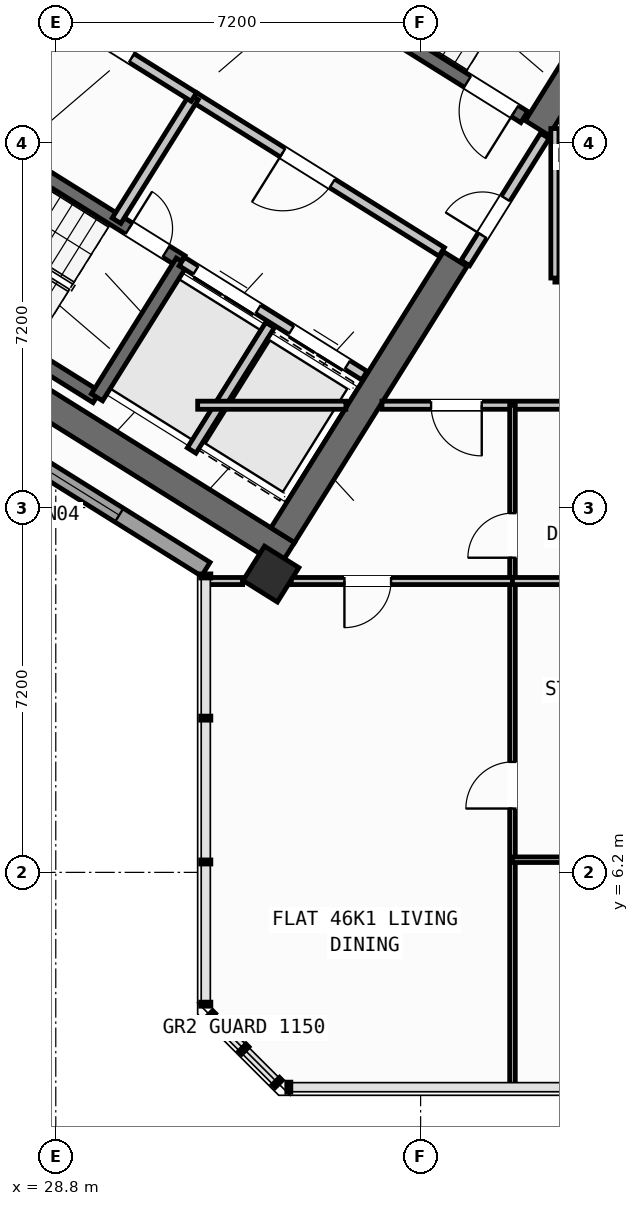
"""IFC4 building model, lengths in metres.
Left out: names, types, materials, properties, quantities, classifications, styles, units other than length and angle.
Written with IfcOpenShell. Run it as: python <this file> out.ifc"""

import sys

from ifc_helpers import new_model, si_unit, direction, frame, frame_2d, origin, origin_2d, place, context, subcontext, project, spatial, rectangle, hollow_rectangle, extrude, source, transform, mapped, element, fill, save


model = new_model("IFC4")
c1 = context("Model", 3, precision=1e-05, world=origin(), true_north=direction((0.0, 1.0)))
c2 = subcontext(c1, "Body", "Model", "MODEL_VIEW")
j1 = project(units=[si_unit("LENGTHUNIT", "METRE"), si_unit("PLANEANGLEUNIT", "RADIAN")], contexts=[c1])
p1 = place(None, origin())
s1 = spatial("IfcSite", under=j1, at=p1, CompositionType="ELEMENT")
p2 = place(p1, origin())
s2 = spatial("IfcBuilding", under=s1, at=p2, CompositionType="ELEMENT")
p3 = place(p2, frame((0.0, 0.0, 184.2)))
s3 = spatial("IfcBuildingStorey", under=s2, at=p3, CompositionType="ELEMENT", Elevation=184.2)
p4 = place(p3, frame((33.366, 12.477, 0.0), z_axis=(0.0, 0.0, 1.0), x_axis=(-0.848047359947, 0.529920442413, 0.0)))
e1 = element("IfcWall", 1, at=p4, inside=s3, PredefinedType="SHEAR", context=c2, shape_type="SweptSolid", body=[
    extrude(rectangle(XDim=13.14, YDim=0.55, at=frame_2d((6.57, 0.0))), origin(), (0.0, 0.0, 1.0), 3.35),
])
p5 = place(p3, frame((40.194, 23.922, 0.0), z_axis=(0.0, 0.0, 1.0), x_axis=(-0.529888438328, -0.848067357541, 0.0)))
e2 = element("IfcWall", 2, at=p5, inside=s3, PredefinedType="SHEAR", context=c2, shape_type="SweptSolid", body=[
    extrude(rectangle(XDim=3.575, YDim=0.55, at=frame_2d((1.788, 0.0))), origin(), (0.0, 0.0, 1.0), 3.35),
])
p6 = place(p3, frame((36.683, 18.304, 0.0), z_axis=(0.0, 0.0, 1.0), x_axis=(-0.529896466841, -0.848062341122, 0.0)))
e3 = element("IfcWall", 3, at=p6, inside=s3, PredefinedType="SHEAR", context=c2, shape_type="SweptSolid", body=[
    extrude(rectangle(XDim=6.425, YDim=0.55, at=frame_2d((3.212, 0.0))), origin(), (0.0, 0.0, 1.0), 3.35),
])
m1 = source(origin(), c2, "Body", "SweptSolid", [
    extrude(hollow_rectangle(XDim=0.8, YDim=0.8, WallThickness=0.032, at=origin_2d()), origin(), (0.0, 0.0, 1.0), 3.6),
])
p7 = place(p3, frame((33.046, 12.087, 0.0), z_axis=(0.0, 0.0, 1.0), x_axis=(-0.848048096156, 0.529919264233, 0.0)))
e4 = element("IfcColumn", 4, at=p7, inside=s3, PredefinedType="COLUMN", context=c2, shape_type="MappedRepresentation", body=[
    mapped(m1, transform((0.0, 0.0, 0.0), scale=1.0)),
])
p8 = place(p3, frame((31.76, 12.183, 0.0), z_axis=(0.0, 0.0, 1.0), x_axis=(-0.848047074256, 0.529920899612, 0.0)))
e5 = element("IfcWall", 5, at=p8, inside=s3, PredefinedType="STANDARD", context=c2, shape_type="SweptSolid", body=[
    extrude(rectangle(XDim=30.652, YDim=0.32, at=frame_2d((15.326, 0.0))), origin(), (0.0, 0.0, 1.0), 3.35),
])
p9 = place(p8, frame((15.166, 0.0, 0.0)))
e6 = element("IfcOpeningElement", 6, at=p9, cuts=e5, PredefinedType="OPENING", context=c2, shape_type="SweptSolid", body=[
    extrude(rectangle(XDim=1.2, YDim=2.15, at=frame_2d((0.6, 1.075))), frame((0.0, 0.17, 0.0), z_axis=(0.0, -1.0, 0.0), x_axis=(1.0, 0.0, 0.0)), (0.0, 0.0, 1.0), 0.34),
])
p10 = place(p8, frame((2.015, 0.0, 0.8)))
e7 = element("IfcOpeningElement", 7, at=p10, cuts=e5, PredefinedType="OPENING", context=c2, shape_type="SweptSolid", body=[
    extrude(rectangle(XDim=2.1, YDim=1.55, at=frame_2d((1.05, 0.775))), frame((0.0, 0.17, 0.0), z_axis=(0.0, -1.0, 0.0), x_axis=(1.0, 0.0, 0.0)), (0.0, 0.0, 1.0), 0.34),
])
p11 = place(p8, frame((7.244, 0.0, 0.8)))
e8 = element("IfcOpeningElement", 8, at=p11, cuts=e5, PredefinedType="OPENING", context=c2, shape_type="SweptSolid", body=[
    extrude(rectangle(XDim=2.1, YDim=1.55, at=frame_2d((1.05, 0.775))), frame((0.0, 0.17, 0.0), z_axis=(0.0, -1.0, 0.0), x_axis=(1.0, 0.0, 0.0)), (0.0, 0.0, 1.0), 0.34),
])
p12 = place(p8, frame((12.623, 0.0, 1.0)))
e9 = element("IfcOpeningElement", 9, at=p12, cuts=e5, PredefinedType="OPENING", context=c2, shape_type="SweptSolid", body=[
    extrude(rectangle(XDim=0.9, YDim=1.25, at=frame_2d((0.45, 0.625))), frame((0.0, 0.17, 0.0), z_axis=(0.0, -1.0, 0.0), x_axis=(1.0, 0.0, 0.0)), (0.0, 0.0, 1.0), 0.34),
])
p13 = place(p8, frame((19.565, 0.0, 0.95)))
e10 = element("IfcOpeningElement", 10, at=p13, cuts=e5, PredefinedType="OPENING", context=c2, shape_type="SweptSolid", body=[
    extrude(rectangle(XDim=1.2, YDim=1.4, at=frame_2d((0.6, 0.7))), frame((0.0, 0.17, 0.0), z_axis=(0.0, -1.0, 0.0), x_axis=(1.0, 0.0, 0.0)), (0.0, 0.0, 1.0), 0.34),
])
p14 = place(p8, frame((25.983, 0.0, 1.0)))
e11 = element("IfcOpeningElement", 11, at=p14, cuts=e5, PredefinedType="OPENING", context=c2, shape_type="SweptSolid", body=[
    extrude(rectangle(XDim=0.9, YDim=1.25, at=frame_2d((0.45, 0.625))), frame((0.0, 0.17, 0.0), z_axis=(0.0, -1.0, 0.0), x_axis=(1.0, 0.0, 0.0)), (0.0, 0.0, 1.0), 0.34),
])
p15 = place(p8, frame((28.433, 0.0, 1.0)))
e12 = element("IfcOpeningElement", 12, at=p15, cuts=e5, PredefinedType="OPENING", context=c2, shape_type="SweptSolid", body=[
    extrude(rectangle(XDim=0.9, YDim=1.25, at=frame_2d((0.45, 0.625))), frame((0.0, 0.17, 0.0), z_axis=(0.0, -1.0, 0.0), x_axis=(1.0, 0.0, 0.0)), (0.0, 0.0, 1.0), 0.34),
])
p16 = place(p3, frame((29.605, 15.581, 0.0), z_axis=(0.0, 0.0, 1.0), x_axis=(-0.848036911448, 0.529937163087, 0.0)))
e13 = element("IfcWall", 13, at=p16, inside=s3, PredefinedType="SHEAR", context=c2, shape_type="SweptSolid", body=[
    extrude(rectangle(XDim=7.46, YDim=0.26, at=frame_2d((3.73, 0.0))), origin(), (0.0, 0.0, 1.0), 3.35),
])
p17 = place(p3, frame((31.28, 18.261, 0.0), z_axis=(0.0, 0.0, 1.0), x_axis=(-0.848051618787, 0.529913626805, 0.0)))
e14 = element("IfcWall", 14, at=p17, inside=s3, PredefinedType="SHEAR", context=c2, shape_type="SweptSolid", body=[
    extrude(rectangle(XDim=7.46, YDim=0.26, at=frame_2d((3.73, 0.0))), origin(), (0.0, 0.0, 1.0), 3.35),
])
p18 = place(p17, frame((0.36, 0.0, 0.0)))
e15 = element("IfcOpeningElement", 15, at=p18, cuts=e14, PredefinedType="OPENING", context=c2, shape_type="SweptSolid", body=[
    extrude(rectangle(XDim=0.86, YDim=2.05, at=frame_2d((0.43, 1.025))), frame((0.0, 0.14, 0.0), z_axis=(0.0, -1.0, 0.0), x_axis=(1.0, 0.0, 0.0)), (0.0, 0.0, 1.0), 0.28),
])
p19 = place(p3, frame((31.288, 18.256, 0.0), z_axis=(0.0, 0.0, 1.0), x_axis=(-0.529943379326, -0.848033026897, 0.0)))
e16 = element("IfcWall", 16, at=p19, inside=s3, PredefinedType="SHEAR", context=c2, shape_type="SweptSolid", body=[
    extrude(rectangle(XDim=3.16, YDim=0.26, at=frame_2d((1.58, 0.0))), origin(), (0.0, 0.0, 1.0), 3.35),
])
p20 = place(p3, frame((38.046, 21.108, 0.0), z_axis=(0.0, 0.0, 1.0), x_axis=(-0.848054434086, 0.529909121291, 0.0)))
e17 = element("IfcWall", 17, at=p20, inside=s3, PredefinedType="SHEAR", context=c2, shape_type="SweptSolid", body=[
    extrude(rectangle(XDim=7.33, YDim=0.26, at=frame_2d((3.665, 0.0))), origin(), (0.0, 0.0, 1.0), 3.35),
])
p21 = place(p20, frame((0.22, 0.0, 0.0)))
e18 = element("IfcOpeningElement", 18, at=p21, cuts=e17, PredefinedType="OPENING", context=c2, shape_type="SweptSolid", body=[
    extrude(rectangle(XDim=1.1, YDim=2.1, at=frame_2d((0.55, 1.05))), frame((0.0, 0.14, 0.0), z_axis=(0.0, -1.0, 0.0), x_axis=(1.0, 0.0, 0.0)), (0.0, 0.0, 1.0), 0.28),
])
p22 = place(p3, frame((34.891, 16.005, 0.0), z_axis=(0.0, 0.0, 1.0), x_axis=(-0.848062873452, 0.529895614884, 0.0)))
e19 = element("IfcWall", 19, at=p22, inside=s3, PredefinedType="STANDARD", context=c2, shape_type="SweptSolid", body=[
    extrude(rectangle(XDim=4.248, YDim=0.2, at=frame_2d((2.124, 0.0))), origin(), (0.0, 0.0, 1.0), 3.34),
])
p23 = place(p22, frame((0.398, 0.0, 0.0)))
e20 = element("IfcOpeningElement", 20, at=p23, cuts=e19, PredefinedType="OPENING", context=c2, shape_type="SweptSolid", body=[
    extrude(rectangle(XDim=1.3, YDim=2.2, at=frame_2d((0.65, 1.1))), frame((0.0, 0.11, 0.0), z_axis=(0.0, -1.0, 0.0), x_axis=(1.0, 0.0, 0.0)), (0.0, 0.0, 1.0), 0.22),
])
p24 = place(p22, frame((2.473, 0.0, 0.0)))
e21 = element("IfcOpeningElement", 21, at=p24, cuts=e19, PredefinedType="OPENING", context=c2, shape_type="SweptSolid", body=[
    extrude(rectangle(XDim=1.45, YDim=2.25, at=frame_2d((0.725, 1.125))), frame((0.0, 0.11, 0.0), z_axis=(0.0, -1.0, 0.0), x_axis=(1.0, 0.0, 0.0)), (0.0, 0.0, 1.0), 0.22),
])
p25 = place(p3, frame((36.417, 18.447, 0.0), z_axis=(0.0, 0.0, 1.0), x_axis=(-0.848064879198, 0.529892404805, 0.0)))
e22 = element("IfcWall", 22, at=p25, inside=s3, PredefinedType="STANDARD", context=c2, shape_type="SweptSolid", body=[
    extrude(rectangle(XDim=5.768, YDim=0.2, at=frame_2d((2.884, 0.0))), origin(), (0.0, 0.0, 1.0), 3.34),
])
p26 = place(p25, frame((2.548, 0.0, 0.0)))
e23 = element("IfcOpeningElement", 23, at=p26, cuts=e22, PredefinedType="OPENING", context=c2, shape_type="SweptSolid", body=[
    extrude(rectangle(XDim=1.15, YDim=2.1, at=frame_2d((0.575, 1.05))), frame((0.0, 0.11, 0.0), z_axis=(0.0, -1.0, 0.0), x_axis=(1.0, 0.0, 0.0)), (0.0, 0.0, 1.0), 0.22),
])
p27 = place(p3, frame((33.029, 17.003, 0.0), z_axis=(0.0, 0.0, 1.0), x_axis=(-0.529916267533, -0.848049968695, 0.0)))
e24 = element("IfcWall", 24, at=p27, inside=s3, PredefinedType="STANDARD", context=c2, shape_type="SweptSolid", body=[
    extrude(rectangle(XDim=2.92, YDim=0.2, at=frame_2d((1.46, 0.0))), origin(), (0.0, 0.0, 1.0), 3.34),
])
for number, where, z_axis, x_axis in (
    (25, (31.525, 21.504, 0.0), (0.0, 0.0, 1.0), (-0.53, -0.848, 0.0)),
    (26, (28.71, 23.263, 0.0), (0.0, 0.0, 1.0), (-0.53, -0.848, 0.0)),
):
    element("IfcWall", number, at=place(p3, frame(where, z_axis=z_axis, x_axis=x_axis)), inside=s3, PredefinedType="STANDARD", context=c2, shape_type="SweptSolid", body=[
        extrude(rectangle(XDim=2.88, YDim=0.2, at=frame_2d((1.44, 0.0))), origin(), (0.0, 0.0, 1.0), 3.34),
    ])
p28 = place(p3, frame((31.525, 21.504, 0.0), z_axis=(0.0, 0.0, 1.0), x_axis=(-0.848040211232, 0.529931882541, 0.0)))
e27 = element("IfcWall", 27, at=p28, inside=s3, PredefinedType="STANDARD", context=c2, shape_type="SweptSolid", body=[
    extrude(rectangle(XDim=6.218, YDim=0.2, at=frame_2d((3.109, 0.0))), origin(), (0.0, 0.0, 1.0), 3.34),
])
p29 = place(p28, frame((4.4, 0.0, 0.0)))
e28 = element("IfcOpeningElement", 28, at=p29, cuts=e27, PredefinedType="OPENING", context=c2, shape_type="SweptSolid", body=[
    extrude(rectangle(XDim=0.86, YDim=2.05, at=frame_2d((0.43, 1.025))), frame((0.0, 0.11, 0.0), z_axis=(0.0, -1.0, 0.0), x_axis=(1.0, 0.0, 0.0)), (0.0, 0.0, 1.0), 0.22),
])
p30 = place(p28, frame((1.45, 0.0, 0.0)))
e29 = element("IfcOpeningElement", 29, at=p30, cuts=e27, PredefinedType="OPENING", context=c2, shape_type="SweptSolid", body=[
    extrude(rectangle(XDim=0.86, YDim=2.05, at=frame_2d((0.43, 1.025))), frame((0.0, 0.11, 0.0), z_axis=(0.0, -1.0, 0.0), x_axis=(1.0, 0.0, 0.0)), (0.0, 0.0, 1.0), 0.22),
])
p31 = place(p3, frame((38.451, 20.737, 0.0), z_axis=(0.0, 0.0, 1.0), x_axis=(-0.529924799939, -0.848044637038, 0.0)))
e30 = element("IfcWall", 30, at=p31, inside=s3, PredefinedType="STANDARD", context=c2, shape_type="SweptSolid", body=[
    extrude(rectangle(XDim=2.96, YDim=0.2, at=frame_2d((1.48, 0.0))), origin(), (0.0, 0.0, 1.0), 3.34),
])
p32 = place(p31, frame((1.46, 0.0, 0.0)))
e31 = element("IfcOpeningElement", 31, at=p32, cuts=e30, PredefinedType="OPENING", context=c2, shape_type="SweptSolid", body=[
    extrude(rectangle(XDim=0.86, YDim=2.05, at=frame_2d((0.43, 1.025))), frame((0.0, 0.11, 0.0), z_axis=(0.0, -1.0, 0.0), x_axis=(1.0, 0.0, 0.0)), (0.0, 0.0, 1.0), 0.22),
])
p33 = place(p3, frame((31.6, 15.42, 0.0), z_axis=(0.0, 0.0, 1.0), x_axis=(1.0, 0.0, 0.0)))
e32 = element("IfcWall", 32, at=p33, inside=s3, PredefinedType="PARTITIONING", context=c2, shape_type="SweptSolid", body=[
    extrude(rectangle(XDim=2.925, YDim=0.16, at=frame_2d((1.462, 0.0))), origin(), (0.0, 0.0, 1.0), 3.34),
])
p34 = place(p3, frame((35.237, 15.42, 0.0), z_axis=(0.0, 0.0, 1.0), x_axis=(1.0, 0.0, 0.0)))
e33 = element("IfcWall", 33, at=p34, inside=s3, PredefinedType="PARTITIONING", context=c2, shape_type="SweptSolid", body=[
    extrude(rectangle(XDim=15.432, YDim=0.16, at=frame_2d((7.716, 0.0))), origin(), (0.0, 0.0, 1.0), 3.34),
])
p35 = place(p34, frame((0.969, 0.0, 0.0)))
e34 = element("IfcOpeningElement", 34, at=p35, cuts=e33, PredefinedType="OPENING", context=c2, shape_type="SweptSolid", body=[
    extrude(rectangle(XDim=1.0, YDim=2.1, at=frame_2d((0.5, 1.05))), frame((0.0, 0.09, 0.0), z_axis=(0.0, -1.0, 0.0), x_axis=(1.0, 0.0, 0.0)), (0.0, 0.0, 1.0), 0.18),
])
p36 = place(p34, frame((8.799, 0.0, 0.0)))
e35 = element("IfcOpeningElement", 35, at=p36, cuts=e33, PredefinedType="OPENING", context=c2, shape_type="SweptSolid", body=[
    extrude(rectangle(XDim=1.0, YDim=2.1, at=frame_2d((0.5, 1.05))), frame((0.0, 0.09, 0.0), z_axis=(0.0, -1.0, 0.0), x_axis=(1.0, 0.0, 0.0)), (0.0, 0.0, 1.0), 0.18),
])
p37 = place(p3, frame((38.65, 17.93, 0.0), z_axis=(0.0, 0.0, 1.0), x_axis=(1.0, 0.0, 0.0)))
e36 = element("IfcWall", 36, at=p37, inside=s3, PredefinedType="PARTITIONING", context=c2, shape_type="SweptSolid", body=[
    extrude(rectangle(XDim=9.95, YDim=0.16, at=frame_2d((4.975, 0.0))), origin(), (0.0, 0.0, 1.0), 3.34),
])
p38 = place(p37, frame((4.475, 0.0, 0.0)))
e37 = element("IfcOpeningElement", 37, at=p38, cuts=e36, PredefinedType="OPENING", context=c2, shape_type="SweptSolid", body=[
    extrude(rectangle(XDim=1.0, YDim=2.1, at=frame_2d((0.5, 1.05))), frame((0.0, 0.09, 0.0), z_axis=(0.0, -1.0, 0.0), x_axis=(1.0, 0.0, 0.0)), (0.0, 0.0, 1.0), 0.18),
])
p39 = place(p3, frame((38.65, 17.93, 0.0), z_axis=(0.0, 0.0, 1.0), x_axis=(0.0, 1.0, 0.0)))
e38 = element("IfcWall", 38, at=p39, inside=s3, PredefinedType="PARTITIONING", context=c2, shape_type="SweptSolid", body=[
    extrude(rectangle(XDim=2.951, YDim=0.16, at=frame_2d((1.476, 0.0))), origin(), (0.0, 0.0, 1.0), 3.34),
])
p40 = place(p3, frame((37.813, 1.96, 0.0), z_axis=(0.0, 0.0, 1.0), x_axis=(0.0, 1.0, 0.0)))
e39 = element("IfcWall", 39, at=p40, inside=s3, PredefinedType="PARTITIONING", context=c2, shape_type="SweptSolid", body=[
    extrude(rectangle(XDim=13.46, YDim=0.11, at=frame_2d((6.73, 0.0))), origin(), (0.0, 0.0, 1.0), 3.34),
])
p41 = place(p40, frame((5.5, 0.0, 0.0)))
e40 = element("IfcOpeningElement", 40, at=p41, cuts=e39, PredefinedType="OPENING", context=c2, shape_type="SweptSolid", body=[
    extrude(rectangle(XDim=0.92, YDim=2.08, at=frame_2d((0.46, 1.04))), frame((0.0, 0.065, 0.0), z_axis=(0.0, -1.0, 0.0), x_axis=(1.0, 0.0, 0.0)), (0.0, 0.0, 1.0), 0.13),
])
p42 = place(p40, frame((10.45, 0.0, 0.0)))
e41 = element("IfcOpeningElement", 41, at=p42, cuts=e39, PredefinedType="OPENING", context=c2, shape_type="SweptSolid", body=[
    extrude(rectangle(XDim=0.88, YDim=2.08, at=frame_2d((0.44, 1.04))), frame((0.0, 0.065, 0.0), z_axis=(0.0, -1.0, 0.0), x_axis=(1.0, 0.0, 0.0)), (0.0, 0.0, 1.0), 0.13),
])
p43 = place(p3, frame((31.74, 11.95, 0.0), z_axis=(0.0, 0.0, 1.0), x_axis=(1.0, 0.0, 0.0)))
e42 = element("IfcWall", 42, at=p43, inside=s3, PredefinedType="PLUMBINGWALL", context=c2, shape_type="SweptSolid", body=[
    extrude(rectangle(XDim=0.748, YDim=0.14, at=frame_2d((0.374, 0.0))), origin(), (0.0, 0.0, 1.0), 3.34),
])
p44 = place(p3, frame((33.447, 11.95, 0.0), z_axis=(0.0, 0.0, 1.0), x_axis=(1.0, 0.0, 0.0)))
e43 = element("IfcWall", 43, at=p44, inside=s3, PredefinedType="PLUMBINGWALL", context=c2, shape_type="SweptSolid", body=[
    extrude(rectangle(XDim=4.366, YDim=0.14, at=frame_2d((2.183, 0.0))), origin(), (0.0, 0.0, 1.0), 2.525),
])
p45 = place(p44, frame((1.05, 0.0, 0.0)))
e44 = element("IfcOpeningElement", 44, at=p45, cuts=e43, PredefinedType="OPENING", context=c2, shape_type="SweptSolid", body=[
    extrude(rectangle(XDim=0.92, YDim=2.08, at=frame_2d((0.46, 1.04))), frame((0.0, 0.08, 0.0), z_axis=(0.0, -1.0, 0.0), x_axis=(1.0, 0.0, 0.0)), (0.0, 0.0, 1.0), 0.16),
])
p46 = place(p3, frame((37.813, 11.95, 0.0), z_axis=(0.0, 0.0, 1.0), x_axis=(1.0, 0.0, 0.0)))
e45 = element("IfcWall", 45, at=p46, inside=s3, PredefinedType="PLUMBINGWALL", context=c2, shape_type="SweptSolid", body=[
    extrude(rectangle(XDim=4.137, YDim=0.14, at=frame_2d((2.068, 0.0))), origin(), (0.0, 0.0, 1.0), 2.525),
])
p47 = place(p3, frame((37.813, 6.45, 0.0), z_axis=(0.0, 0.0, 1.0), x_axis=(1.0, 0.0, 0.0)))
e46 = element("IfcWall", 46, at=p47, inside=s3, PredefinedType="PARTITIONING", context=c2, shape_type="SweptSolid", body=[
    extrude(rectangle(XDim=4.137, YDim=0.11, at=frame_2d((2.068, 0.0))), origin(), (0.0, 0.0, 1.0), 3.34),
])
p48 = place(p47, frame((1.608, 0.0, 0.0)))
e47 = element("IfcOpeningElement", 47, at=p48, cuts=e46, PredefinedType="OPENING", context=c2, shape_type="SweptSolid", body=[
    extrude(rectangle(XDim=0.92, YDim=2.08, at=frame_2d((0.46, 1.04))), frame((0.0, 0.065, 0.0), z_axis=(0.0, -1.0, 0.0), x_axis=(1.0, 0.0, 0.0)), (0.0, 0.0, 1.0), 0.13),
])
m2 = source(origin(), c2, "Body", "SweptSolid", [
    extrude(rectangle(XDim=2.1, YDim=1.55, at=frame_2d((1.05, 0.775))), frame((0.0, 0.03, 0.0), z_axis=(0.0, -1.0, 0.0), x_axis=(1.0, 0.0, 0.0)), (0.0, 0.0, 1.0), 0.06),
])
p49 = place(p10, origin())
e48 = element("IfcWindow", 48, at=p49, inside=s3, PartitioningType="SINGLE_PANEL", PredefinedType="WINDOW", context=c2, shape_type="MappedRepresentation", body=[
    mapped(m2, transform((0.0, 0.0, 0.0), scale=1.0)),
])
fill(e7, e48)
m3 = source(origin(), c2, "Body", "SweptSolid", [
    extrude(rectangle(XDim=0.86, YDim=2.05, at=frame_2d((0.43, 1.025))), frame((0.0, 0.025, 0.0), z_axis=(0.0, -1.0, 0.0), x_axis=(1.0, 0.0, 0.0)), (0.0, 0.0, 1.0), 0.05),
])
p50 = place(p18, frame((0.86, 0.0, 0.0), z_axis=(0.0, 0.0, 1.0), x_axis=(-1.0, 0.0, 0.0)))
e49 = element("IfcDoor", 49, at=p50, inside=s3, OperationType="SINGLE_SWING_LEFT", PredefinedType="DOOR", context=c2, shape_type="MappedRepresentation", body=[
    mapped(m3, transform((0.0, 0.0, 0.0), scale=1.0)),
])
fill(e15, e49)
m4 = source(origin(), c2, "Body", "SweptSolid", [
    extrude(rectangle(XDim=1.1, YDim=2.1, at=frame_2d((0.55, 1.05))), frame((0.0, 0.025, 0.0), z_axis=(0.0, -1.0, 0.0), x_axis=(1.0, 0.0, 0.0)), (0.0, 0.0, 1.0), 0.05),
])
p51 = place(p21, origin())
e50 = element("IfcDoor", 50, at=p51, inside=s3, OperationType="SINGLE_SWING_LEFT", PredefinedType="DOOR", context=c2, shape_type="MappedRepresentation", body=[
    mapped(m4, transform((0.0, 0.0, 0.0), scale=1.0)),
])
fill(e18, e50)
m5 = source(origin(), c2, "Body", "SweptSolid", [
    extrude(rectangle(XDim=1.15, YDim=2.1, at=frame_2d((0.575, 1.05))), frame((0.0, 0.025, 0.0), z_axis=(0.0, -1.0, 0.0), x_axis=(1.0, 0.0, 0.0)), (0.0, 0.0, 1.0), 0.05),
])
p52 = place(p26, origin())
e51 = element("IfcDoor", 51, at=p52, inside=s3, OperationType="SINGLE_SWING_RIGHT", PredefinedType="DOOR", context=c2, shape_type="MappedRepresentation", body=[
    mapped(m5, transform((0.0, 0.0, 0.0), scale=1.0)),
])
fill(e23, e51)
m6 = source(origin(), c2, "Body", "SweptSolid", [
    extrude(rectangle(XDim=1.3, YDim=2.2, at=frame_2d((0.65, 1.1))), frame((0.0, 0.025, 0.0), z_axis=(0.0, -1.0, 0.0), x_axis=(1.0, 0.0, 0.0)), (0.0, 0.0, 1.0), 0.05),
])
p53 = place(p23, origin())
e52 = element("IfcDoor", 52, at=p53, inside=s3, OperationType="DOUBLE_DOOR_SLIDING", PredefinedType="DOOR", context=c2, shape_type="MappedRepresentation", body=[
    mapped(m6, transform((0.0, 0.0, 0.0), scale=1.0)),
])
fill(e20, e52)
m7 = source(origin(), c2, "Body", "SweptSolid", [
    extrude(rectangle(XDim=1.45, YDim=2.25, at=frame_2d((0.725, 1.125))), frame((0.0, 0.025, 0.0), z_axis=(0.0, -1.0, 0.0), x_axis=(1.0, 0.0, 0.0)), (0.0, 0.0, 1.0), 0.05),
])
p54 = place(p24, origin())
e53 = element("IfcDoor", 53, at=p54, inside=s3, OperationType="DOUBLE_DOOR_SLIDING", PredefinedType="DOOR", context=c2, shape_type="MappedRepresentation", body=[
    mapped(m7, transform((0.0, 0.0, 0.0), scale=1.0)),
])
fill(e21, e53)
p55 = place(p30, frame((0.86, 0.0, 0.0), z_axis=(0.0, 0.0, 1.0), x_axis=(-1.0, 0.0, 0.0)))
e54 = element("IfcDoor", 54, at=p55, inside=s3, OperationType="SINGLE_SWING_RIGHT", PredefinedType="DOOR", context=c2, shape_type="MappedRepresentation", body=[
    mapped(m3, transform((0.0, 0.0, 0.0), scale=1.0)),
])
fill(e29, e54)
p56 = place(p32, frame((0.86, 0.0, 0.0), z_axis=(0.0, 0.0, 1.0), x_axis=(-1.0, 0.0, 0.0)))
e55 = element("IfcDoor", 55, at=p56, inside=s3, OperationType="SINGLE_SWING_LEFT", PredefinedType="DOOR", context=c2, shape_type="MappedRepresentation", body=[
    mapped(m3, transform((0.0, 0.0, 0.0), scale=1.0)),
])
fill(e31, e55)
m8 = source(origin(), c2, "Body", "SweptSolid", [
    extrude(rectangle(XDim=0.92, YDim=2.08, at=frame_2d((0.46, 1.04))), frame((0.0, 0.025, 0.0), z_axis=(0.0, -1.0, 0.0), x_axis=(1.0, 0.0, 0.0)), (0.0, 0.0, 1.0), 0.05),
])
p57 = place(p41, origin())
e56 = element("IfcDoor", 56, at=p57, inside=s3, OperationType="SINGLE_SWING_LEFT", PredefinedType="DOOR", context=c2, shape_type="MappedRepresentation", body=[
    mapped(m8, transform((0.0, 0.0, 0.0), scale=1.0)),
])
fill(e40, e56)
m9 = source(origin(), c2, "Body", "SweptSolid", [
    extrude(rectangle(XDim=1.0, YDim=2.1, at=frame_2d((0.5, 1.05))), frame((0.0, 0.025, 0.0), z_axis=(0.0, -1.0, 0.0), x_axis=(1.0, 0.0, 0.0)), (0.0, 0.0, 1.0), 0.05),
])
p58 = place(p35, frame((1.0, 0.0, 0.0), z_axis=(0.0, 0.0, 1.0), x_axis=(-1.0, 0.0, 0.0)))
e57 = element("IfcDoor", 57, at=p58, inside=s3, OperationType="SINGLE_SWING_LEFT", PredefinedType="DOOR", context=c2, shape_type="MappedRepresentation", body=[
    mapped(m9, transform((0.0, 0.0, 0.0), scale=1.0)),
])
fill(e34, e57)
p59 = place(p45, frame((0.92, 0.0, 0.0), z_axis=(0.0, 0.0, 1.0), x_axis=(-1.0, 0.0, 0.0)))
e58 = element("IfcDoor", 58, at=p59, inside=s3, OperationType="SINGLE_SWING_RIGHT", PredefinedType="DOOR", context=c2, shape_type="MappedRepresentation", body=[
    mapped(m8, transform((0.0, 0.0, 0.0), scale=1.0)),
])
fill(e44, e58)
m10 = source(origin(), c2, "Body", "SweptSolid", [
    extrude(rectangle(XDim=0.88, YDim=2.08, at=frame_2d((0.44, 1.04))), frame((0.0, 0.025, 0.0), z_axis=(0.0, -1.0, 0.0), x_axis=(1.0, 0.0, 0.0)), (0.0, 0.0, 1.0), 0.05),
])
p60 = place(p42, origin())
e59 = element("IfcDoor", 59, at=p60, inside=s3, OperationType="SINGLE_SWING_LEFT", PredefinedType="DOOR", context=c2, shape_type="MappedRepresentation", body=[
    mapped(m10, transform((0.0, 0.0, 0.0), scale=1.0)),
])
fill(e41, e59)
save(model, sys.argv[1])
